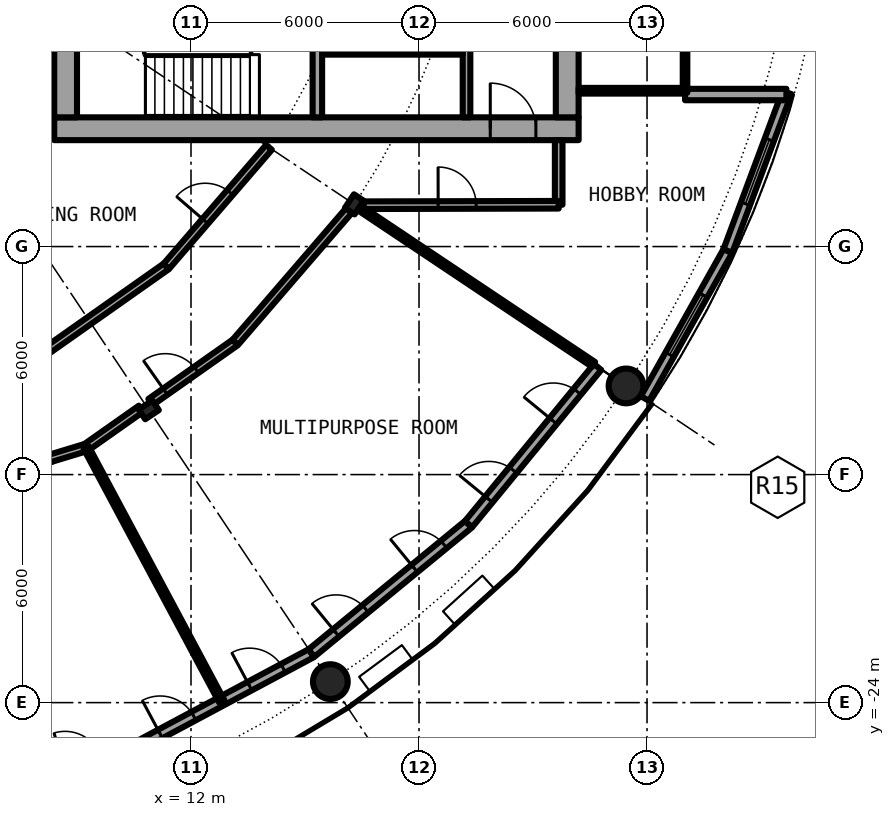
"""IFC4 building model, lengths in metres.
Left out: names, types, materials, properties, quantities, classifications, styles, units other than length and angle.
Written with IfcOpenShell. Run it as: python <this file> out.ifc"""

import sys

from ifc_helpers import new_model, si_unit, direction, frame, frame_2d, origin, origin_2d, place, context, subcontext, project, spatial, rectangle, hollow_circle, i_section, extrude, element, fill, save


model = new_model("IFC4")
c1 = context("Model", 3, precision=1e-05, world=origin(), true_north=direction((0.0, 1.0)))
c2 = subcontext(c1, "Body", "Model", "MODEL_VIEW")
j1 = project(units=[si_unit("LENGTHUNIT", "METRE"), si_unit("PLANEANGLEUNIT", "RADIAN")], contexts=[c1])
p1 = place(None, origin())
s1 = spatial("IfcSite", under=j1, at=p1, CompositionType="ELEMENT")
p2 = place(p1, origin())
s2 = spatial("IfcBuilding", under=s1, at=p2, CompositionType="ELEMENT")
p3 = place(p2, frame((0.0, 0.0, 107.45)))
s3 = spatial("IfcBuildingStorey", under=s2, at=p3, CompositionType="ELEMENT", Elevation=107.45)
for number, where, z_axis, x_axis in (
    (1, (15.667, -23.448, 0.0), (0.0, 0.0, 1.0), (1.0, 0.0, 0.0)),
    (2, (23.448, -15.667, 0.0), (0.0, 0.0, 1.0), (1.0, 0.0, 0.0)),
):
    element("IfcColumn", number, at=place(p3, frame(where, z_axis=z_axis, x_axis=x_axis)), inside=s3, PredefinedType="COLUMN", context=c2, shape_type="SweptSolid", body=[
        extrude(hollow_circle(Radius=0.457, WallThickness=0.04, at=origin_2d()), origin(), (0.0, 0.0, 1.0), 4.2),
    ])
for number, where, z_axis, x_axis in (
    (3, (10.889, -16.297, 0.0), (0.0, 0.0, 1.0), (0.556, -0.831, 0.0)),
    (4, (16.297, -10.889, 0.0), (0.0, 0.0, 1.0), (0.831, -0.556, 0.0)),
):
    element("IfcColumn", number, at=place(p3, frame(where, z_axis=z_axis, x_axis=x_axis)), inside=s3, PredefinedType="COLUMN", context=c2, shape_type="SweptSolid", body=[
        extrude(i_section(OverallWidth=0.307, OverallDepth=0.432, WebThickness=0.021, FlangeThickness=0.04, FilletRadius=0.027, at=origin_2d()), origin(), (0.0, 0.0, 1.0), 4.2),
    ])
p4 = place(p3, frame((10.447, -25.222, 0.0), z_axis=(0.0, 0.0, 1.0), x_axis=(0.881915646801, 0.471407246368, 0.0)))
e5 = element("IfcWall", 5, at=p4, inside=s3, PredefinedType="SOLIDWALL", context=c2, shape_type="SweptSolid", body=[
    extrude(rectangle(XDim=5.352, YDim=0.25, at=frame_2d((2.676, 0.0))), origin(), (0.0, 0.0, 1.0), 3.85),
])
p5 = place(p4, frame((0.841, 0.0, 0.0)))
e6 = element("IfcOpeningElement", 6, at=p5, cuts=e5, PredefinedType="OPENING", context=c2, shape_type="SweptSolid", body=[
    extrude(rectangle(XDim=1.0, YDim=2.2, at=frame_2d((0.5, 1.1))), frame((0.0, 0.135, 0.0), z_axis=(0.0, -1.0, 0.0), x_axis=(1.0, 0.0, 0.0)), (0.0, 0.0, 1.0), 0.27),
])
p6 = place(p4, frame((3.51, 0.0, 0.0)))
e7 = element("IfcOpeningElement", 7, at=p6, cuts=e5, PredefinedType="OPENING", context=c2, shape_type="SweptSolid", body=[
    extrude(rectangle(XDim=1.0, YDim=2.2, at=frame_2d((0.5, 1.1))), frame((0.0, 0.135, 0.0), z_axis=(0.0, -1.0, 0.0), x_axis=(1.0, 0.0, 0.0)), (0.0, 0.0, 1.0), 0.27),
])
p7 = place(p3, frame((15.167, -22.699, 0.0), z_axis=(0.0, 0.0, 1.0), x_axis=(0.773019449054, 0.634382322723, 0.0)))
e8 = element("IfcWall", 8, at=p7, inside=s3, PredefinedType="SOLIDWALL", context=c2, shape_type="SweptSolid", body=[
    extrude(rectangle(XDim=5.352, YDim=0.25, at=frame_2d((2.676, 0.0))), origin(), (0.0, 0.0, 1.0), 3.85),
])
p8 = place(p7, frame((0.841, 0.0, 0.0)))
e9 = element("IfcOpeningElement", 9, at=p8, cuts=e8, PredefinedType="OPENING", context=c2, shape_type="SweptSolid", body=[
    extrude(rectangle(XDim=1.0, YDim=2.2, at=frame_2d((0.5, 1.1))), frame((0.0, 0.135, 0.0), z_axis=(0.0, -1.0, 0.0), x_axis=(1.0, 0.0, 0.0)), (0.0, 0.0, 1.0), 0.27),
])
p9 = place(p7, frame((3.51, 0.0, 0.0)))
e10 = element("IfcOpeningElement", 10, at=p9, cuts=e8, PredefinedType="OPENING", context=c2, shape_type="SweptSolid", body=[
    extrude(rectangle(XDim=1.0, YDim=2.2, at=frame_2d((0.5, 1.1))), frame((0.0, 0.135, 0.0), z_axis=(0.0, -1.0, 0.0), x_axis=(1.0, 0.0, 0.0)), (0.0, 0.0, 1.0), 0.27),
])
p10 = place(p3, frame((19.304, -19.304, 0.0), z_axis=(0.0, 0.0, 1.0), x_axis=(0.634382322723, 0.773019449054, 0.0)))
e11 = element("IfcWall", 11, at=p10, inside=s3, PredefinedType="SOLIDWALL", context=c2, shape_type="SweptSolid", body=[
    extrude(rectangle(XDim=5.352, YDim=0.25, at=frame_2d((2.676, 0.0))), origin(), (0.0, 0.0, 1.0), 3.85),
])
p11 = place(p10, frame((0.841, 0.0, 0.0)))
e12 = element("IfcOpeningElement", 12, at=p11, cuts=e11, PredefinedType="OPENING", context=c2, shape_type="SweptSolid", body=[
    extrude(rectangle(XDim=1.0, YDim=2.2, at=frame_2d((0.5, 1.1))), frame((0.0, 0.135, 0.0), z_axis=(0.0, -1.0, 0.0), x_axis=(1.0, 0.0, 0.0)), (0.0, 0.0, 1.0), 0.27),
])
p12 = place(p10, frame((3.51, 0.0, 0.0)))
e13 = element("IfcOpeningElement", 13, at=p12, cuts=e11, PredefinedType="OPENING", context=c2, shape_type="SweptSolid", body=[
    extrude(rectangle(XDim=1.0, YDim=2.2, at=frame_2d((0.5, 1.1))), frame((0.0, 0.135, 0.0), z_axis=(0.0, -1.0, 0.0), x_axis=(1.0, 0.0, 0.0)), (0.0, 0.0, 1.0), 0.27),
])
p13 = place(p3, frame((23.946, -16.0, 0.0), z_axis=(0.0, 0.0, 1.0), x_axis=(0.489696356642, 0.871893042919, 0.0)))
e14 = element("IfcWall", 14, at=p13, inside=s3, PredefinedType="SOLIDWALL", context=c2, shape_type="SweptSolid", body=[
    extrude(rectangle(XDim=4.454, YDim=0.25, at=frame_2d((2.227, 0.0))), origin(), (0.0, 0.0, 1.0), 3.85),
])
p14 = place(p13, frame((1.327, 0.0, 0.3)))
e15 = element("IfcOpeningElement", 15, at=p14, cuts=e14, PredefinedType="OPENING", context=c2, shape_type="SweptSolid", body=[
    extrude(rectangle(XDim=1.8, YDim=2.1, at=frame_2d((0.9, 1.05))), frame((0.0, 0.135, 0.0), z_axis=(0.0, -1.0, 0.0), x_axis=(1.0, 0.0, 0.0)), (0.0, 0.0, 1.0), 0.27),
])
p15 = place(p3, frame((26.127, -12.117, 0.0), z_axis=(0.0, 0.0, 1.0), x_axis=(0.349247811493, 0.937030397675, 0.0)))
e16 = element("IfcWall", 16, at=p15, inside=s3, PredefinedType="SOLIDWALL", context=c2, shape_type="SweptSolid", body=[
    extrude(rectangle(XDim=4.452, YDim=0.25, at=frame_2d((2.226, 0.0))), origin(), (0.0, 0.0, 1.0), 3.85),
])
p16 = place(p15, frame((1.327, 0.0, 0.3)))
e17 = element("IfcOpeningElement", 17, at=p16, cuts=e16, PredefinedType="OPENING", context=c2, shape_type="SweptSolid", body=[
    extrude(rectangle(XDim=1.8, YDim=2.1, at=frame_2d((0.9, 1.05))), frame((0.0, 0.135, 0.0), z_axis=(0.0, -1.0, 0.0), x_axis=(1.0, 0.0, 0.0)), (0.0, 0.0, 1.0), 0.27),
])
p17 = place(p3, frame((25.0, -8.0, 0.0), z_axis=(0.0, 0.0, 1.0), x_axis=(1.0, 0.0, 0.0)))
e18 = element("IfcWall", 18, at=p17, inside=s3, PredefinedType="SOLIDWALL", context=c2, shape_type="SweptSolid", body=[
    extrude(rectangle(XDim=2.667, YDim=0.3, at=frame_2d((1.333, 0.0))), origin(), (0.0, 0.0, 1.0), 3.85),
])
p18 = place(p3, frame((8.4, -8.9, 0.0), z_axis=(0.0, 0.0, 1.0), x_axis=(1.0, 0.0, 0.0)))
e19 = element("IfcWall", 19, at=p18, inside=s3, PredefinedType="SHEAR", context=c2, shape_type="SweptSolid", body=[
    extrude(rectangle(XDim=13.8, YDim=0.6, at=frame_2d((6.9, 0.0))), origin(), (0.0, 0.0, 1.0), 4.2),
])
p19 = place(p18, frame((11.475, 0.0, 0.0)))
e20 = element("IfcOpeningElement", 20, at=p19, cuts=e19, PredefinedType="OPENING", context=c2, shape_type="SweptSolid", body=[
    extrude(rectangle(XDim=1.2, YDim=2.3, at=frame_2d((0.6, 1.15))), frame((0.0, 0.31, 0.0), z_axis=(0.0, -1.0, 0.0), x_axis=(1.0, 0.0, 0.0)), (0.0, 0.0, 1.0), 0.62),
])
p20 = place(p3, frame((21.9, 8.6, 0.0), z_axis=(0.0, 0.0, 1.0), x_axis=(0.0, -1.0, 0.0)))
e21 = element("IfcWall", 21, at=p20, inside=s3, PredefinedType="SHEAR", context=c2, shape_type="SweptSolid", body=[
    extrude(rectangle(XDim=17.2, YDim=0.6, at=frame_2d((8.6, 0.0))), origin(), (0.0, 0.0, 1.0), 4.2),
])
p21 = place(p20, frame((7.7, 0.0, 0.0)))
e22 = element("IfcOpeningElement", 22, at=p21, cuts=e21, PredefinedType="OPENING", context=c2, shape_type="SweptSolid", body=[
    extrude(rectangle(XDim=1.8, YDim=2.3, at=frame_2d((0.9, 1.15))), frame((0.0, 0.31, 0.0), z_axis=(0.0, -1.0, 0.0), x_axis=(1.0, 0.0, 0.0)), (0.0, 0.0, 1.0), 0.62),
])
p22 = place(p3, frame((8.7, -8.6, 0.0), z_axis=(0.0, 0.0, 1.0), x_axis=(0.0, 1.0, 0.0)))
e23 = element("IfcWall", 23, at=p22, inside=s3, PredefinedType="SHEAR", context=c2, shape_type="SweptSolid", body=[
    extrude(rectangle(XDim=17.2, YDim=0.6, at=frame_2d((8.6, 0.0))), origin(), (0.0, 0.0, 1.0), 4.2),
])
p23 = place(p22, frame((7.4, 0.0, 0.1)))
e24 = element("IfcOpeningElement", 24, at=p23, cuts=e23, PredefinedType="OPENING", context=c2, shape_type="SweptSolid", body=[
    extrude(rectangle(XDim=2.4, YDim=2.2, at=frame_2d((1.2, 1.1))), frame((0.0, 0.31, 0.0), z_axis=(0.0, -1.0, 0.0), x_axis=(1.0, 0.0, 0.0)), (0.0, 0.0, 1.0), 0.62),
])
p24 = place(p3, frame((15.325, -8.6, 0.0), z_axis=(0.0, 0.0, 1.0), x_axis=(0.0, 1.0, 0.0)))
e25 = element("IfcWall", 25, at=p24, inside=s3, PredefinedType="SHEAR", context=c2, shape_type="SweptSolid", body=[
    extrude(rectangle(XDim=3.95, YDim=0.25, at=frame_2d((1.975, 0.0))), origin(), (0.0, 0.0, 1.0), 4.2),
])
p25 = place(p24, frame((2.025, 0.0, 0.0)))
e26 = element("IfcOpeningElement", 26, at=p25, cuts=e25, PredefinedType="OPENING", context=c2, shape_type="SweptSolid", body=[
    extrude(rectangle(XDim=1.2, YDim=2.3, at=frame_2d((0.6, 1.15))), frame((0.0, 0.135, 0.0), z_axis=(0.0, -1.0, 0.0), x_axis=(1.0, 0.0, 0.0)), (0.0, 0.0, 1.0), 0.27),
])
p26 = place(p3, frame((19.25, -8.6, 0.0), z_axis=(0.0, 0.0, 1.0), x_axis=(0.0, 1.0, 0.0)))
e27 = element("IfcWall", 27, at=p26, inside=s3, PredefinedType="SOLIDWALL", context=c2, shape_type="SweptSolid", body=[
    extrude(rectangle(XDim=7.025, YDim=0.2, at=frame_2d((3.513, 0.0))), origin(), (0.0, 0.0, 1.0), 3.85),
])
p27 = place(p26, frame((2.35, 0.0, 0.0)))
e28 = element("IfcOpeningElement", 28, at=p27, cuts=e27, PredefinedType="OPENING", context=c2, shape_type="SweptSolid", body=[
    extrude(rectangle(XDim=1.1, YDim=2.3, at=frame_2d((0.55, 1.15))), frame((0.0, 0.11, 0.0), z_axis=(0.0, -1.0, 0.0), x_axis=(1.0, 0.0, 0.0)), (0.0, 0.0, 1.0), 0.22),
])
p28 = place(p3, frame((15.45, -6.875, 0.0), z_axis=(0.0, 0.0, 1.0), x_axis=(1.0, 0.0, 0.0)))
e29 = element("IfcWall", 29, at=p28, inside=s3, PredefinedType="PARTITIONING", context=c2, shape_type="SweptSolid", body=[
    extrude(rectangle(XDim=3.7, YDim=0.15, at=frame_2d((1.85, 0.0))), origin(), (0.0, 0.0, 1.0), 3.85),
])
p29 = place(p28, frame((1.4, 0.0, 0.0)))
e30 = element("IfcOpeningElement", 30, at=p29, cuts=e29, PredefinedType="OPENING", context=c2, shape_type="SweptSolid", body=[
    extrude(rectangle(XDim=0.9, YDim=2.3, at=frame_2d((0.45, 1.15))), frame((0.0, 0.085, 0.0), z_axis=(0.0, -1.0, 0.0), x_axis=(1.0, 0.0, 0.0)), (0.0, 0.0, 1.0), 0.17),
])
p30 = place(p3, frame((22.2, -7.9, 0.0), z_axis=(0.0, 0.0, 1.0), x_axis=(1.0, 0.0, 0.0)))
e31 = element("IfcWall", 31, at=p30, inside=s3, PredefinedType="PARTITIONING", context=c2, shape_type="SweptSolid", body=[
    extrude(rectangle(XDim=2.74, YDim=0.15, at=frame_2d((1.37, 0.0))), origin(), (0.0, 0.0, 1.0), 3.85),
])
p31 = place(p3, frame((25.0, -7.95, 0.0), z_axis=(0.0, 0.0, 1.0), x_axis=(0.0, 1.0, 0.0)))
e32 = element("IfcWall", 32, at=p31, inside=s3, PredefinedType="PARTITIONING", context=c2, shape_type="SweptSolid", body=[
    extrude(rectangle(XDim=15.9, YDim=0.12, at=frame_2d((7.95, 0.0))), origin(), (0.0, 0.0, 1.0), 3.85),
])
p32 = place(p31, frame((0.95, 0.0, 0.1)))
e33 = element("IfcOpeningElement", 33, at=p32, cuts=e32, PredefinedType="OPENING", context=c2, shape_type="SweptSolid", body=[
    extrude(rectangle(XDim=14.0, YDim=3.5, at=frame_2d((7.0, 1.75))), frame((0.0, 0.07, 0.0), z_axis=(0.0, -1.0, 0.0), x_axis=(1.0, 0.0, 0.0)), (0.0, 0.0, 1.0), 0.14),
])
p33 = place(p3, frame((21.675, -10.9, 0.0), z_axis=(0.0, 0.0, 1.0), x_axis=(0.0, 1.0, 0.0)))
e34 = element("IfcWall", 34, at=p33, inside=s3, PredefinedType="PARTITIONING", context=c2, shape_type="SweptSolid", body=[
    extrude(rectangle(XDim=1.7, YDim=0.2, at=frame_2d((0.85, 0.0))), origin(), (0.0, 0.0, 1.0), 3.85),
])
p34 = place(p3, frame((9.239, -17.286, 0.0), z_axis=(0.0, 0.0, 1.0), x_axis=(0.817743843048, 0.575582320052, 0.0)))
e35 = element("IfcWall", 35, at=p34, inside=s3, PredefinedType="PARTITIONING", context=c2, shape_type="SweptSolid", body=[
    extrude(rectangle(XDim=1.768, YDim=0.2, at=frame_2d((0.884, 0.0))), origin(), (0.0, 0.0, 1.0), 3.54),
])
p35 = place(p3, frame((10.936, -16.091, 0.0), z_axis=(0.0, 0.0, 1.0), x_axis=(0.817645456482, 0.575722074872, 0.0)))
e36 = element("IfcWall", 36, at=p35, inside=s3, PredefinedType="PARTITIONING", context=c2, shape_type="SweptSolid", body=[
    extrude(rectangle(XDim=2.724, YDim=0.2, at=frame_2d((1.362, 0.0))), origin(), (0.0, 0.0, 1.0), 3.54),
])
p36 = place(p35, frame((0.474, 0.0, 0.0)))
e37 = element("IfcOpeningElement", 37, at=p36, cuts=e36, PredefinedType="OPENING", context=c2, shape_type="SweptSolid", body=[
    extrude(rectangle(XDim=1.0, YDim=2.3, at=frame_2d((0.5, 1.15))), frame((0.0, 0.11, 0.0), z_axis=(0.0, -1.0, 0.0), x_axis=(1.0, 0.0, 0.0)), (0.0, 0.0, 1.0), 0.22),
])
p37 = place(p3, frame((13.163, -14.523, 0.0), z_axis=(0.0, 0.0, 1.0), x_axis=(0.653087281304, 0.757282644063, 0.0)))
e38 = element("IfcWall", 38, at=p37, inside=s3, PredefinedType="PARTITIONING", context=c2, shape_type="SweptSolid", body=[
    extrude(rectangle(XDim=4.644, YDim=0.2, at=frame_2d((2.322, 0.0))), origin(), (0.0, 0.0, 1.0), 3.54),
])
p38 = place(p3, frame((1.921, -19.506, 0.0), z_axis=(0.0, 0.0, 1.0), x_axis=(0.956929842753, 0.290319265721, 0.0)))
e39 = element("IfcWall", 39, at=p38, inside=s3, PredefinedType="PARTITIONING", context=c2, shape_type="SweptSolid", body=[
    extrude(rectangle(XDim=7.647, YDim=0.2, at=frame_2d((3.824, 0.0))), origin(), (0.0, 0.0, 1.0), 3.54),
])
p39 = place(p3, frame((7.967, -14.904, 0.0), z_axis=(0.0, 0.0, 1.0), x_axis=(0.817567680547, 0.575832517079, 0.0)))
e40 = element("IfcWall", 40, at=p39, inside=s3, PredefinedType="PARTITIONING", context=c2, shape_type="SweptSolid", body=[
    extrude(rectangle(XDim=4.137, YDim=0.2, at=frame_2d((2.068, 0.0))), origin(), (0.0, 0.0, 1.0), 3.85),
])
p40 = place(p3, frame((11.349, -12.522, 0.0), z_axis=(0.0, 0.0, 1.0), x_axis=(0.653212695939, 0.757174467256, 0.0)))
e41 = element("IfcWall", 41, at=p40, inside=s3, PredefinedType="PARTITIONING", context=c2, shape_type="SweptSolid", body=[
    extrude(rectangle(XDim=4.138, YDim=0.2, at=frame_2d((2.069, 0.0))), origin(), (0.0, 0.0, 1.0), 3.85),
])
p41 = place(p40, frame((1.569, 0.0, 0.0)))
e42 = element("IfcOpeningElement", 42, at=p41, cuts=e41, PredefinedType="OPENING", context=c2, shape_type="SweptSolid", body=[
    extrude(rectangle(XDim=1.0, YDim=2.3, at=frame_2d((0.5, 1.15))), frame((0.0, 0.11, 0.0), z_axis=(0.0, -1.0, 0.0), x_axis=(1.0, 0.0, 0.0)), (0.0, 0.0, 1.0), 0.22),
])
p42 = place(p3, frame((16.541, -10.912, 0.0), z_axis=(0.0, 0.0, 1.0), x_axis=(0.999997173357, 0.002377662213, 0.0)))
e43 = element("IfcWall", 43, at=p42, inside=s3, PredefinedType="PARTITIONING", context=c2, shape_type="SweptSolid", body=[
    extrude(rectangle(XDim=5.134, YDim=0.2, at=frame_2d((2.567, 0.0))), origin(), (0.0, 0.0, 1.0), 3.85),
])
p43 = place(p42, frame((1.963, 0.0, 0.0)))
e44 = element("IfcOpeningElement", 44, at=p43, cuts=e43, PredefinedType="OPENING", context=c2, shape_type="SweptSolid", body=[
    extrude(rectangle(XDim=1.0, YDim=2.3, at=frame_2d((0.5, 1.15))), frame((0.0, 0.11, 0.0), z_axis=(0.0, -1.0, 0.0), x_axis=(1.0, 0.0, 0.0)), (0.0, 0.0, 1.0), 0.22),
])
p44 = place(p3, frame((9.239, -17.286, 0.0), z_axis=(0.0, 0.0, 1.0), x_axis=(0.471439510802, -0.881898399848, 0.0)))
e45 = element("IfcWall", 45, at=p44, inside=s3, PredefinedType="PARTITIONING", context=c2, shape_type="SweptSolid", body=[
    extrude(rectangle(XDim=7.575, YDim=0.15, at=frame_2d((3.787, 0.0))), origin(), (0.0, 0.0, 1.0), 3.85),
])
p45 = place(p3, frame((16.474, -11.012, 0.0), z_axis=(0.0, 0.0, 1.0), x_axis=(0.83143223768, -0.555626164023, 0.0)))
e46 = element("IfcWall", 46, at=p45, inside=s3, PredefinedType="PARTITIONING", context=c2, shape_type="SweptSolid", body=[
    extrude(rectangle(XDim=7.359, YDim=0.15, at=frame_2d((3.68, 0.0))), origin(), (0.0, 0.0, 1.0), 3.85),
])
p46 = place(p5, origin())
e47 = element("IfcDoor", 47, at=p46, inside=s3, OperationType="SINGLE_SWING_LEFT", PredefinedType="DOOR", context=c2, shape_type="SweptSolid", body=[
    extrude(rectangle(XDim=1.0, YDim=2.2, at=frame_2d((0.5, 1.1))), frame((0.0, 0.025, 0.0), z_axis=(0.0, -1.0, 0.0), x_axis=(1.0, 0.0, 0.0)), (0.0, 0.0, 1.0), 0.05),
])
fill(e6, e47)
p47 = place(p6, origin())
e48 = element("IfcDoor", 48, at=p47, inside=s3, OperationType="SINGLE_SWING_LEFT", PredefinedType="DOOR", context=c2, shape_type="SweptSolid", body=[
    extrude(rectangle(XDim=1.0, YDim=2.2, at=frame_2d((0.5, 1.1))), frame((0.0, 0.025, 0.0), z_axis=(0.0, -1.0, 0.0), x_axis=(1.0, 0.0, 0.0)), (0.0, 0.0, 1.0), 0.05),
])
fill(e7, e48)
p48 = place(p8, origin())
e49 = element("IfcDoor", 49, at=p48, inside=s3, OperationType="SINGLE_SWING_LEFT", PredefinedType="DOOR", context=c2, shape_type="SweptSolid", body=[
    extrude(rectangle(XDim=1.0, YDim=2.2, at=frame_2d((0.5, 1.1))), frame((0.0, 0.025, 0.0), z_axis=(0.0, -1.0, 0.0), x_axis=(1.0, 0.0, 0.0)), (0.0, 0.0, 1.0), 0.05),
])
fill(e9, e49)
p49 = place(p9, origin())
e50 = element("IfcDoor", 50, at=p49, inside=s3, OperationType="SINGLE_SWING_LEFT", PredefinedType="DOOR", context=c2, shape_type="SweptSolid", body=[
    extrude(rectangle(XDim=1.0, YDim=2.2, at=frame_2d((0.5, 1.1))), frame((0.0, 0.025, 0.0), z_axis=(0.0, -1.0, 0.0), x_axis=(1.0, 0.0, 0.0)), (0.0, 0.0, 1.0), 0.05),
])
fill(e10, e50)
p50 = place(p11, origin())
e51 = element("IfcDoor", 51, at=p50, inside=s3, OperationType="SINGLE_SWING_LEFT", PredefinedType="DOOR", context=c2, shape_type="SweptSolid", body=[
    extrude(rectangle(XDim=1.0, YDim=2.2, at=frame_2d((0.5, 1.1))), frame((0.0, 0.025, 0.0), z_axis=(0.0, -1.0, 0.0), x_axis=(1.0, 0.0, 0.0)), (0.0, 0.0, 1.0), 0.05),
])
fill(e12, e51)
p51 = place(p12, origin())
e52 = element("IfcDoor", 52, at=p51, inside=s3, OperationType="SINGLE_SWING_LEFT", PredefinedType="DOOR", context=c2, shape_type="SweptSolid", body=[
    extrude(rectangle(XDim=1.0, YDim=2.2, at=frame_2d((0.5, 1.1))), frame((0.0, 0.025, 0.0), z_axis=(0.0, -1.0, 0.0), x_axis=(1.0, 0.0, 0.0)), (0.0, 0.0, 1.0), 0.05),
])
fill(e13, e52)
p52 = place(p14, origin())
e53 = element("IfcWindow", 53, at=p52, inside=s3, PartitioningType="SINGLE_PANEL", PredefinedType="WINDOW", context=c2, shape_type="SweptSolid", body=[
    extrude(rectangle(XDim=1.8, YDim=2.1, at=frame_2d((0.9, 1.05))), frame((0.0, 0.03, 0.0), z_axis=(0.0, -1.0, 0.0), x_axis=(1.0, 0.0, 0.0)), (0.0, 0.0, 1.0), 0.06),
])
fill(e15, e53)
p53 = place(p16, origin())
e54 = element("IfcWindow", 54, at=p53, inside=s3, PartitioningType="SINGLE_PANEL", PredefinedType="WINDOW", context=c2, shape_type="SweptSolid", body=[
    extrude(rectangle(XDim=1.8, YDim=2.1, at=frame_2d((0.9, 1.05))), frame((0.0, 0.03, 0.0), z_axis=(0.0, -1.0, 0.0), x_axis=(1.0, 0.0, 0.0)), (0.0, 0.0, 1.0), 0.06),
])
fill(e17, e54)
p54 = place(p29, origin())
e55 = element("IfcDoor", 55, at=p54, inside=s3, OperationType="SINGLE_SWING_LEFT", PredefinedType="DOOR", context=c2, shape_type="SweptSolid", body=[
    extrude(rectangle(XDim=0.9, YDim=2.3, at=frame_2d((0.45, 1.15))), frame((0.0, 0.025, 0.0), z_axis=(0.0, -1.0, 0.0), x_axis=(1.0, 0.0, 0.0)), (0.0, 0.0, 1.0), 0.05),
])
fill(e30, e55)
p55 = place(p19, origin())
e56 = element("IfcDoor", 56, at=p55, inside=s3, OperationType="SINGLE_SWING_LEFT", PredefinedType="DOOR", context=c2, shape_type="SweptSolid", body=[
    extrude(rectangle(XDim=1.2, YDim=2.3, at=frame_2d((0.6, 1.15))), frame((0.0, 0.025, 0.0), z_axis=(0.0, -1.0, 0.0), x_axis=(1.0, 0.0, 0.0)), (0.0, 0.0, 1.0), 0.05),
])
fill(e20, e56)
p56 = place(p32, origin())
e57 = element("IfcWindow", 57, at=p56, inside=s3, PartitioningType="SINGLE_PANEL", PredefinedType="WINDOW", context=c2, shape_type="SweptSolid", body=[
    extrude(rectangle(XDim=14.0, YDim=3.5, at=frame_2d((7.0, 1.75))), frame((0.0, 0.03, 0.0), z_axis=(0.0, -1.0, 0.0), x_axis=(1.0, 0.0, 0.0)), (0.0, 0.0, 1.0), 0.06),
])
fill(e33, e57)
p57 = place(p36, origin())
e58 = element("IfcDoor", 58, at=p57, inside=s3, OperationType="SINGLE_SWING_LEFT", PredefinedType="DOOR", context=c2, shape_type="SweptSolid", body=[
    extrude(rectangle(XDim=1.0, YDim=2.3, at=frame_2d((0.5, 1.15))), frame((0.0, 0.025, 0.0), z_axis=(0.0, -1.0, 0.0), x_axis=(1.0, 0.0, 0.0)), (0.0, 0.0, 1.0), 0.05),
])
fill(e37, e58)
p58 = place(p41, origin())
e59 = element("IfcDoor", 59, at=p58, inside=s3, OperationType="SINGLE_SWING_RIGHT", PredefinedType="DOOR", context=c2, shape_type="SweptSolid", body=[
    extrude(rectangle(XDim=1.0, YDim=2.3, at=frame_2d((0.5, 1.15))), frame((0.0, 0.025, 0.0), z_axis=(0.0, -1.0, 0.0), x_axis=(1.0, 0.0, 0.0)), (0.0, 0.0, 1.0), 0.05),
])
fill(e42, e59)
p59 = place(p43, origin())
e60 = element("IfcDoor", 60, at=p59, inside=s3, OperationType="SINGLE_SWING_LEFT", PredefinedType="DOOR", context=c2, shape_type="SweptSolid", body=[
    extrude(rectangle(XDim=1.0, YDim=2.3, at=frame_2d((0.5, 1.15))), frame((0.0, 0.025, 0.0), z_axis=(0.0, -1.0, 0.0), x_axis=(1.0, 0.0, 0.0)), (0.0, 0.0, 1.0), 0.05),
])
fill(e44, e60)
save(model, sys.argv[1])
